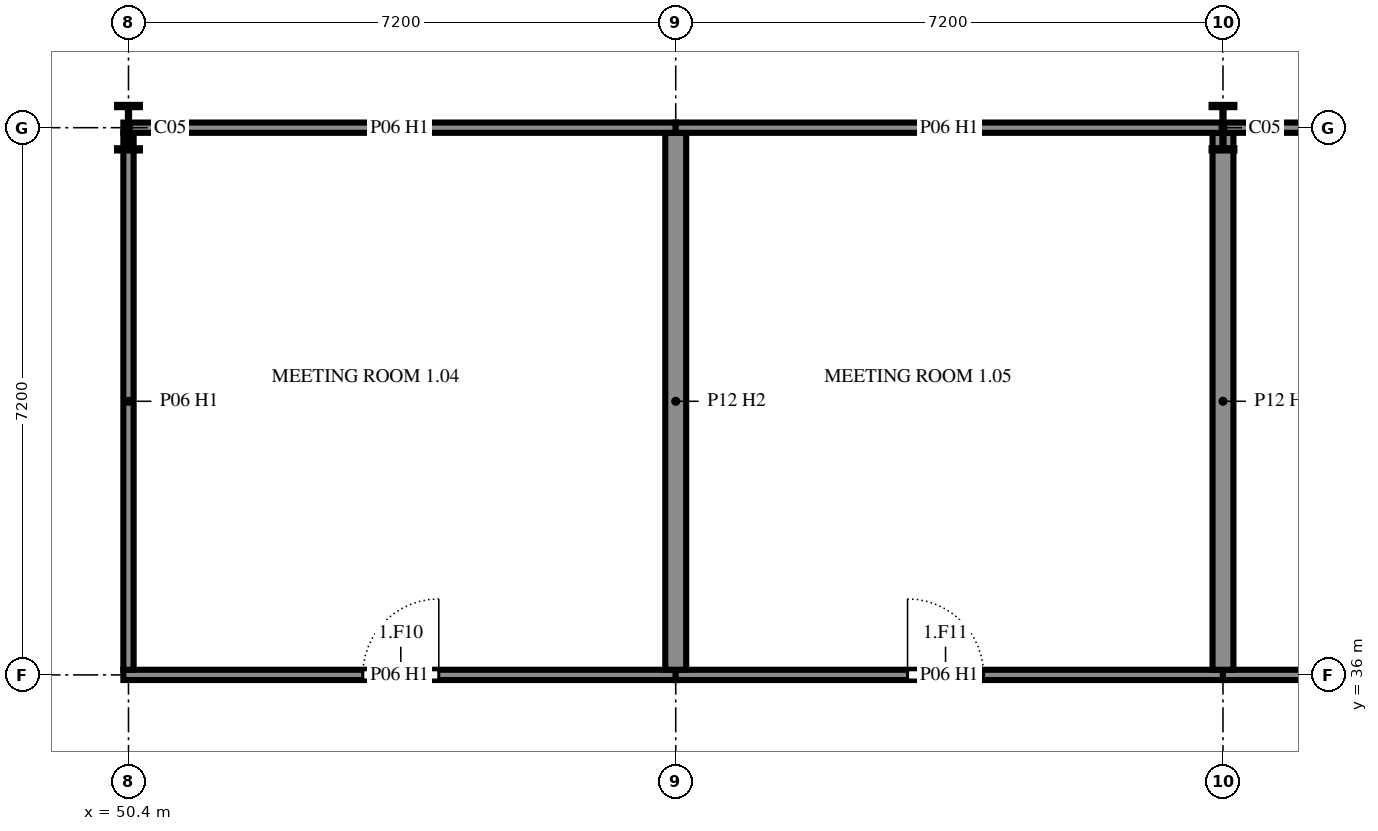
"""IFC4 building model, lengths in metres.
Left out: names, types, materials, properties, quantities, classifications, styles, units other than length and angle.
Written with IfcOpenShell. Run it as: python <this file> out.ifc"""

import sys

from ifc_helpers import new_model, si_unit, direction, frame, frame_2d, origin, origin_2d, place, context, subcontext, project, spatial, rectangle, i_section, extrude, element, fill, save


model = new_model("IFC4")
c1 = context("Model", 3, precision=1e-05, world=origin(), true_north=direction((0.0, 1.0)))
c2 = subcontext(c1, "Body", "Model", "MODEL_VIEW")
j1 = project(units=[si_unit("LENGTHUNIT", "METRE"), si_unit("PLANEANGLEUNIT", "RADIAN")], contexts=[c1])
p1 = place(None, origin())
s1 = spatial("IfcSite", under=j1, at=p1, CompositionType="ELEMENT")
p2 = place(p1, origin())
s2 = spatial("IfcBuilding", under=s1, at=p2, CompositionType="ELEMENT")
p3 = place(p2, frame((0.0, 0.0, 3.6)))
s3 = spatial("IfcBuildingStorey", under=s2, at=p3, CompositionType="ELEMENT", Elevation=3.6)
for number, where, z_axis, x_axis in (
    (1, (50.4, 43.2, 0.0), (0.0, 0.0, 1.0), (1.0, 0.0, 0.0)),
    (2, (64.8, 43.2, 0.0), (0.0, 0.0, 1.0), (1.0, 0.0, 0.0)),
):
    element("IfcColumn", number, at=place(p3, frame(where, z_axis=z_axis, x_axis=x_axis)), inside=s3, PredefinedType="COLUMN", context=c2, shape_type="SweptSolid", body=[
        extrude(i_section(OverallWidth=0.3, OverallDepth=0.6, WebThickness=0.015, FlangeThickness=0.03, FilletRadius=0.027, at=origin_2d()), origin(), (0.0, 0.0, 1.0), 3.6),
    ])
p4 = place(p3, frame((50.333, 36.0, 0.0), z_axis=(0.0, 0.0, 1.0), x_axis=(1.0, 0.0, 0.0)))
e3 = element("IfcWall", 3, at=p4, inside=s3, PredefinedType="PARTITIONING", context=c2, shape_type="SweptSolid", body=[
    extrude(rectangle(XDim=7.268, YDim=0.135, at=frame_2d((3.634, 0.0))), origin(), (0.0, 0.0, 1.0), 2.82),
])
p5 = place(p4, frame((3.15, 0.0, 0.0)))
e4 = element("IfcOpeningElement", 4, at=p5, cuts=e3, PredefinedType="OPENING", context=c2, shape_type="SweptSolid", body=[
    extrude(rectangle(XDim=1.0, YDim=2.4, at=frame_2d((0.5, 1.2))), frame((0.0, 0.077, 0.0), z_axis=(0.0, -1.0, 0.0), x_axis=(1.0, 0.0, 0.0)), (0.0, 0.0, 1.0), 0.155),
])
p6 = place(p3, frame((57.6, 36.0, 0.0), z_axis=(0.0, 0.0, 1.0), x_axis=(1.0, 0.0, 0.0)))
e5 = element("IfcWall", 5, at=p6, inside=s3, PredefinedType="PARTITIONING", context=c2, shape_type="SweptSolid", body=[
    extrude(rectangle(XDim=7.2, YDim=0.135, at=frame_2d((3.6, 0.0))), origin(), (0.0, 0.0, 1.0), 2.82),
])
p7 = place(p6, frame((3.05, 0.0, 0.0)))
e6 = element("IfcOpeningElement", 6, at=p7, cuts=e5, PredefinedType="OPENING", context=c2, shape_type="SweptSolid", body=[
    extrude(rectangle(XDim=1.0, YDim=2.4, at=frame_2d((0.5, 1.2))), frame((0.0, 0.077, 0.0), z_axis=(0.0, -1.0, 0.0), x_axis=(1.0, 0.0, 0.0)), (0.0, 0.0, 1.0), 0.155),
])
p8 = place(p3, frame((64.8, 36.0, 0.0), z_axis=(0.0, 0.0, 1.0), x_axis=(1.0, 0.0, 0.0)))
e7 = element("IfcWall", 7, at=p8, inside=s3, PredefinedType="PARTITIONING", context=c2, shape_type="SweptSolid", body=[
    extrude(rectangle(XDim=7.267, YDim=0.135, at=frame_2d((3.634, 0.0))), origin(), (0.0, 0.0, 1.0), 2.82),
])
p9 = place(p8, frame((3.15, 0.0, 0.0)))
e8 = element("IfcOpeningElement", 8, at=p9, cuts=e7, PredefinedType="OPENING", context=c2, shape_type="SweptSolid", body=[
    extrude(rectangle(XDim=1.0, YDim=2.4, at=frame_2d((0.5, 1.2))), frame((0.0, 0.077, 0.0), z_axis=(0.0, -1.0, 0.0), x_axis=(1.0, 0.0, 0.0)), (0.0, 0.0, 1.0), 0.155),
])
p10 = place(p3, frame((50.4, 43.133, 0.0), z_axis=(0.0, 0.0, 1.0), x_axis=(0.0, -1.0, 0.0)))
e9 = element("IfcWall", 9, at=p10, inside=s3, PredefinedType="PARTITIONING", context=c2, shape_type="SweptSolid", body=[
    extrude(rectangle(XDim=7.065, YDim=0.135, at=frame_2d((3.533, 0.0))), origin(), (0.0, 0.0, 1.0), 2.82),
])
p11 = place(p3, frame((57.6, 43.133, 0.0), z_axis=(0.0, 0.0, 1.0), x_axis=(0.0, -1.0, 0.0)))
e10 = element("IfcWall", 10, at=p11, inside=s3, PredefinedType="PARTITIONING", context=c2, shape_type="SweptSolid", body=[
    extrude(rectangle(XDim=7.065, YDim=0.275, at=frame_2d((3.533, 0.0))), origin(), (0.0, 0.0, 1.0), 3.12),
])
p12 = place(p3, frame((50.333, 43.2, 0.0), z_axis=(0.0, 0.0, 1.0), x_axis=(1.0, 0.0, 0.0)))
e11 = element("IfcWall", 11, at=p12, inside=s3, PredefinedType="PARTITIONING", context=c2, shape_type="SweptSolid", body=[
    extrude(rectangle(XDim=7.268, YDim=0.135, at=frame_2d((3.634, 0.0))), origin(), (0.0, 0.0, 1.0), 2.82),
])
p13 = place(p3, frame((64.8, 43.133, 0.0), z_axis=(0.0, 0.0, 1.0), x_axis=(0.0, -1.0, 0.0)))
e12 = element("IfcWall", 12, at=p13, inside=s3, PredefinedType="PARTITIONING", context=c2, shape_type="SweptSolid", body=[
    extrude(rectangle(XDim=7.065, YDim=0.275, at=frame_2d((3.533, 0.0))), origin(), (0.0, 0.0, 1.0), 2.82),
])
p14 = place(p3, frame((57.6, 43.2, 0.0), z_axis=(0.0, 0.0, 1.0), x_axis=(1.0, 0.0, 0.0)))
e13 = element("IfcWall", 13, at=p14, inside=s3, PredefinedType="PARTITIONING", context=c2, shape_type="SweptSolid", body=[
    extrude(rectangle(XDim=7.2, YDim=0.135, at=frame_2d((3.6, 0.0))), origin(), (0.0, 0.0, 1.0), 2.82),
])
p15 = place(p3, frame((64.8, 43.2, 0.0), z_axis=(0.0, 0.0, 1.0), x_axis=(1.0, 0.0, 0.0)))
e14 = element("IfcWall", 14, at=p15, inside=s3, PredefinedType="PARTITIONING", context=c2, shape_type="SweptSolid", body=[
    extrude(rectangle(XDim=7.267, YDim=0.135, at=frame_2d((3.634, 0.0))), origin(), (0.0, 0.0, 1.0), 2.82),
])
p16 = place(p5, origin())
e15 = element("IfcDoor", 15, at=p16, inside=s3, OperationType="SINGLE_SWING_LEFT", PredefinedType="DOOR", context=c2, shape_type="SweptSolid", body=[
    extrude(rectangle(XDim=1.0, YDim=2.4, at=frame_2d((0.5, 1.2))), frame((0.0, 0.025, 0.0), z_axis=(0.0, -1.0, 0.0), x_axis=(1.0, 0.0, 0.0)), (0.0, 0.0, 1.0), 0.05),
])
fill(e4, e15)
p17 = place(p7, origin())
e16 = element("IfcDoor", 16, at=p17, inside=s3, OperationType="SINGLE_SWING_RIGHT", PredefinedType="DOOR", context=c2, shape_type="SweptSolid", body=[
    extrude(rectangle(XDim=1.0, YDim=2.4, at=frame_2d((0.5, 1.2))), frame((0.0, 0.025, 0.0), z_axis=(0.0, -1.0, 0.0), x_axis=(1.0, 0.0, 0.0)), (0.0, 0.0, 1.0), 0.05),
])
fill(e6, e16)
save(model, sys.argv[1])
